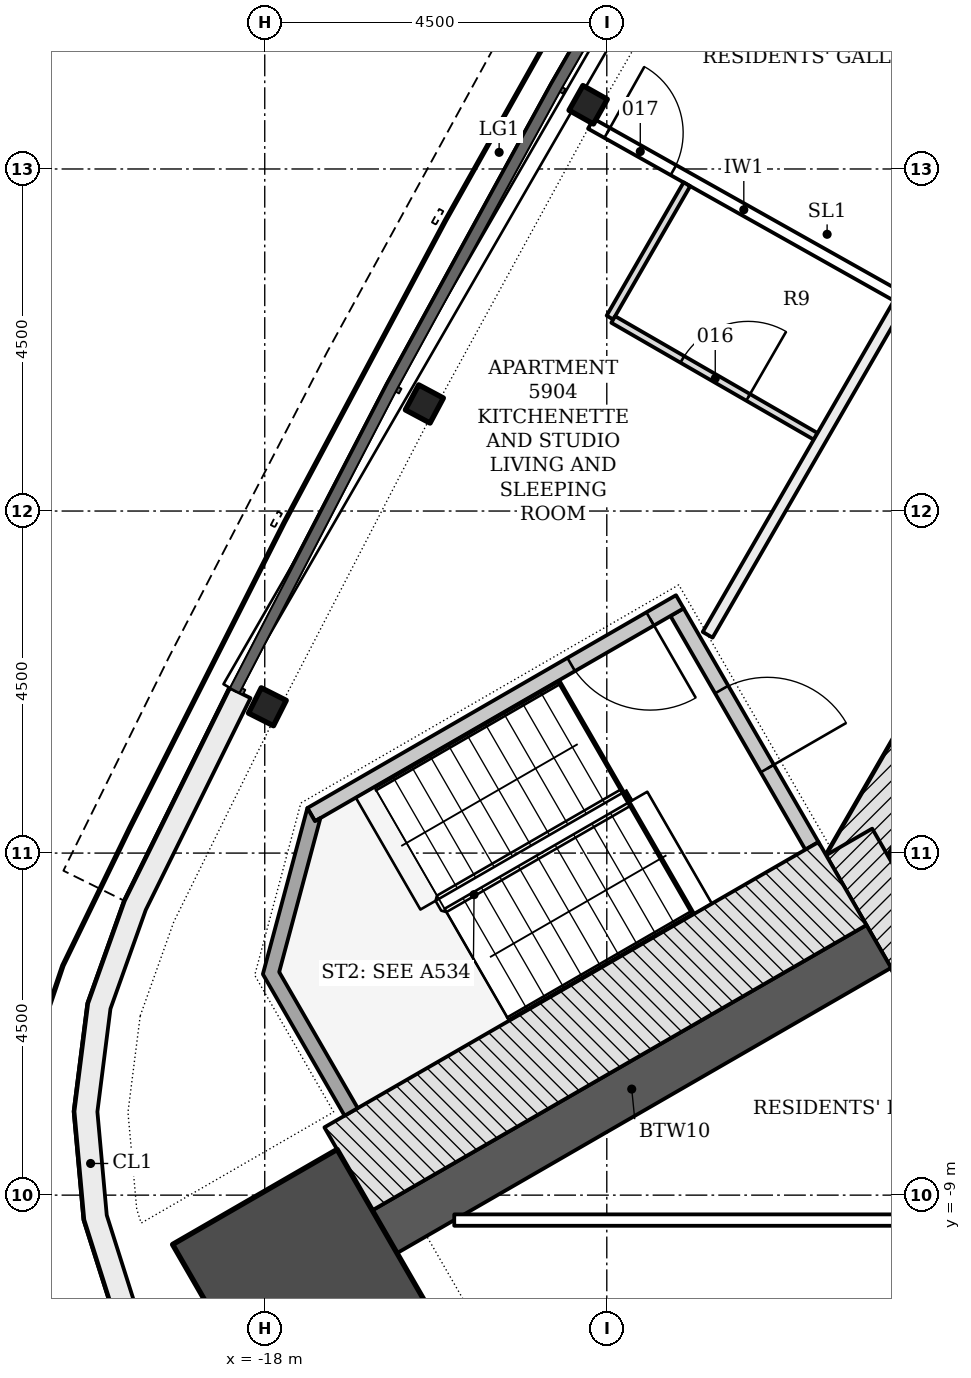
"""IFC4 building model, lengths in metres.
Left out: names, types, materials, properties, quantities, classifications, styles, units other than length and angle.
Written with IfcOpenShell. Run it as: python <this file> out.ifc"""

import sys

from ifc_helpers import new_model, si_unit, direction, frame, frame_2d, origin, origin_2d, place, context, subcontext, project, spatial, polyline, rectangle, i_section, outline, extrude, element, fill, save


model = new_model("IFC4")
c1 = context("Model", 3, precision=1e-05, world=origin(), true_north=direction((0.0, 1.0)))
c2 = subcontext(c1, "Body", "Model", "MODEL_VIEW")
j1 = project(units=[si_unit("LENGTHUNIT", "METRE"), si_unit("PLANEANGLEUNIT", "RADIAN")], contexts=[c1])
p1 = place(None, origin())
s1 = spatial("IfcSite", under=j1, at=p1, CompositionType="ELEMENT")
p2 = place(p1, origin())
s2 = spatial("IfcBuilding", under=s1, at=p2, CompositionType="ELEMENT")
p3 = place(p2, frame((0.0, 0.0, 229.2)))
s3 = spatial("IfcBuildingStorey", under=s2, at=p3, CompositionType="ELEMENT", Elevation=229.2)
p4 = place(p3, frame((-1.083, 11.281, -0.2), z_axis=(0.0, 0.0, 1.0), x_axis=(-0.500001446645, -0.866024568562, 0.0)))
e1 = element("IfcWall", 1, at=p4, inside=s3, PredefinedType="SHEAR", context=c2, shape_type="SweptSolid", body=[
    extrude(rectangle(XDim=18.458, YDim=0.7, at=frame_2d((9.229, 0.0))), origin(), (0.0, 0.0, 1.0), 3.6),
])
p5 = place(p4, frame((8.979, 0.0, 0.2)))
e2 = element("IfcOpeningElement", 2, at=p5, cuts=e1, PredefinedType="OPENING", context=c2, shape_type="SweptSolid", body=[
    extrude(rectangle(XDim=1.2, YDim=2.1, at=frame_2d((0.6, 1.05))), frame((0.0, 0.36, 0.0), z_axis=(0.0, -1.0, 0.0), x_axis=(1.0, 0.0, 0.0)), (0.0, 0.0, 1.0), 0.72),
])
p6 = place(p4, frame((11.029, 0.0, 0.2)))
e3 = element("IfcOpeningElement", 3, at=p6, cuts=e1, PredefinedType="OPENING", context=c2, shape_type="SweptSolid", body=[
    extrude(rectangle(XDim=1.2, YDim=2.1, at=frame_2d((0.6, 1.05))), frame((0.0, 0.36, 0.0), z_axis=(0.0, -1.0, 0.0), x_axis=(1.0, 0.0, 0.0)), (0.0, 0.0, 1.0), 0.72),
])
p7 = place(p3, frame((-10.311, -4.353, -0.2), z_axis=(0.0, 0.0, 1.0), x_axis=(0.500042739161, -0.866000726912, 0.0)))
e4 = element("IfcWall", 4, at=p7, inside=s3, PredefinedType="SHEAR", context=c2, shape_type="SweptSolid", body=[
    extrude(rectangle(XDim=2.771, YDim=0.7, at=frame_2d((1.386, 0.0))), origin(), (0.0, 0.0, 1.0), 3.6),
])
p8 = place(p3, frame((-9.922, -5.728, -0.2), z_axis=(0.0, 0.0, 1.0), x_axis=(-0.866026891245, -0.499997423634, 0.0)))
e5 = element("IfcWall", 5, at=p8, inside=s3, PredefinedType="SHEAR", context=c2, shape_type="SweptSolid", body=[
    extrude(rectangle(XDim=7.506, YDim=0.65, at=frame_2d((3.753, 0.0))), origin(), (0.0, 0.0, 1.0), 3.6),
])
p9 = place(p3, frame((-17.505, -10.106, -0.2), z_axis=(0.0, 0.0, 1.0), x_axis=(-0.866025403784, -0.5, 0.0)))
e6 = element("IfcColumn", 6, at=p9, inside=s3, PredefinedType="COLUMN", context=c2, shape_type="SweptSolid", body=[
    extrude(rectangle(XDim=2.5, YDim=2.5, at=origin_2d()), origin(), (0.0, 0.0, 1.0), 3.6),
])
for number, where, z_axis, x_axis in (
    (7, (-13.745, 5.345, -0.2), (0.0, 0.0, 1.0), (-0.49, -0.872, 0.0)),
    (8, (-15.9, 1.409, -0.2), (0.0, 0.0, 1.0), (-0.47, -0.883, 0.0)),
    (9, (-17.965, -2.575, -0.2), (0.0, 0.0, 1.0), (-0.45, -0.893, 0.0)),
):
    element("IfcColumn", number, at=place(p3, frame(where, z_axis=z_axis, x_axis=x_axis)), inside=s3, PredefinedType="COLUMN", context=c2, shape_type="SweptSolid", body=[
        extrude(i_section(OverallWidth=0.373, OverallDepth=0.368, WebThickness=0.015, FlangeThickness=0.024, FilletRadius=0.015, at=origin_2d()), origin(), (0.0, 0.0, 1.0), 3.6),
    ])
p10 = place(p3, origin())
e10 = element("IfcWall", 10, at=p10, inside=s3, PredefinedType="NOTDEFINED", context=c2, shape_type="SweptSolid", body=[
    extrude(outline(polyline([(-18.457, -2.328), (-19.842, -5.13), (-20.323, -6.478), (-20.504, -7.898), (-20.375, -9.323), (-19.942, -10.687), (-19.227, -11.927), (-18.261, -12.983), (-17.092, -13.808), (-15.772, -14.361), (-14.364, -14.619), (-11.244, -14.82), (-11.225, -14.521), (-14.327, -14.32), (-15.686, -14.072), (-16.945, -13.544), (-18.062, -12.757), (-18.983, -11.748), (-19.666, -10.566), (-20.079, -9.264), (-20.202, -7.903), (-20.03, -6.548), (-19.565, -5.248), (-18.188, -2.46), (-18.457, -2.328)])), origin(), (0.0, 0.0, 1.0), 3.3),
])
p11 = place(p3, frame((-12.576, -1.331, -0.2), z_axis=(0.0, 0.0, 1.0), x_axis=(0.499970499736, -0.8660424351, 0.0)))
e11 = element("IfcWall", 11, at=p11, inside=s3, PredefinedType="SHEAR", context=c2, shape_type="SweptSolid", body=[
    extrude(rectangle(XDim=3.55, YDim=0.2, at=frame_2d((1.775, 0.0))), origin(), (0.0, 0.0, 1.0), 3.6),
])
p12 = place(p11, frame((1.175, 0.0, 0.2)))
e12 = element("IfcOpeningElement", 12, at=p12, cuts=e11, PredefinedType="OPENING", context=c2, shape_type="SweptSolid", body=[
    extrude(rectangle(XDim=1.2, YDim=2.1, at=frame_2d((0.6, 1.05))), frame((0.0, 0.11, 0.0), z_axis=(0.0, -1.0, 0.0), x_axis=(1.0, 0.0, 0.0)), (0.0, 0.0, 1.0), 0.22),
])
p13 = place(p3, frame((-12.539, -1.194, -0.2), z_axis=(0.0, 0.0, 1.0), x_axis=(-0.866045472092, -0.499965239061, 0.0)))
e13 = element("IfcWall", 13, at=p13, inside=s3, PredefinedType="SHEAR", context=c2, shape_type="SweptSolid", body=[
    extrude(rectangle(XDim=5.6, YDim=0.2, at=frame_2d((2.8, 0.0))), origin(), (0.0, 0.0, 1.0), 3.6),
])
p14 = place(p13, frame((0.45, 0.0, 0.2)))
e14 = element("IfcOpeningElement", 14, at=p14, cuts=e13, PredefinedType="OPENING", context=c2, shape_type="SweptSolid", body=[
    extrude(rectangle(XDim=1.2, YDim=2.1, at=frame_2d((0.6, 1.05))), frame((0.0, 0.11, 0.0), z_axis=(0.0, -1.0, 0.0), x_axis=(1.0, 0.0, 0.0)), (0.0, 0.0, 1.0), 0.22),
])
p15 = place(p3, frame((-10.399, -4.901, -0.2), z_axis=(0.0, 0.0, 1.0), x_axis=(-0.866020939036, -0.500007733091, 0.0)))
e15 = element("IfcWall", 15, at=p15, inside=s3, PredefinedType="SHEAR", context=c2, shape_type="SweptSolid", body=[
    extrude(rectangle(XDim=7.507, YDim=1.261, at=frame_2d((3.753, 0.0))), origin(), (0.0, 0.0, 1.0), 3.6),
])
p16 = place(p3, frame((0.0, 0.0, -0.2)))
e16 = element("IfcWall", 16, at=p16, inside=s3, PredefinedType="SHEAR", context=c2, shape_type="SweptSolid", body=[
    extrude(outline(polyline([(-17.439, -3.907), (-18.025, -6.093), (-16.95, -7.955), (-16.777, -7.855), (-17.81, -6.065), (-17.267, -4.039), (-17.339, -4.081), (-17.339, -4.081), (-17.339, -4.081), (-17.339, -4.081), (-17.339, -4.081), (-17.339, -4.081), (-17.339, -4.081), (-17.339, -4.081), (-17.339, -4.081), (-17.339, -4.081), (-17.339, -4.081), (-17.339, -4.081), (-17.339, -4.081), (-17.339, -4.081), (-17.339, -4.081), (-17.339, -4.081), (-17.339, -4.081), (-17.439, -3.907)])), origin(), (0.0, 0.0, 1.0), 3.6),
])
p17 = place(p3, frame((-15.507, -9.328, 0.0), z_axis=(0.0, 0.0, 1.0), x_axis=(1.0, 0.0, 0.0)))
e17 = element("IfcWall", 17, at=p17, inside=s3, PredefinedType="PARTITIONING", context=c2, shape_type="SweptSolid", body=[
    extrude(rectangle(XDim=13.522, YDim=0.15, at=frame_2d((6.761, 0.0))), origin(), (0.0, 0.0, 1.0), 2.852),
])
p18 = place(p17, frame((6.236, 0.0, 0.0)))
e18 = element("IfcOpeningElement", 18, at=p18, cuts=e17, PredefinedType="OPENING", context=c2, shape_type="SweptSolid", body=[
    extrude(rectangle(XDim=1.0, YDim=2.1, at=frame_2d((0.5, 1.05))), frame((0.0, 0.085, 0.0), z_axis=(0.0, -1.0, 0.0), x_axis=(1.0, 0.0, 0.0)), (0.0, 0.0, 1.0), 0.17),
])
p19 = place(p3, frame((-9.619, 2.795, 0.0), z_axis=(0.0, 0.0, 1.0), x_axis=(-0.499963809755, -0.866046297224, 0.0)))
e19 = element("IfcWall", 19, at=p19, inside=s3, PredefinedType="PARTITIONING", context=c2, shape_type="SweptSolid", body=[
    extrude(rectangle(XDim=5.108, YDim=0.15, at=frame_2d((2.554, 0.0))), origin(), (0.0, 0.0, 1.0), 2.852),
])
p20 = place(p3, frame((-13.71, 5.096, 0.0), z_axis=(0.0, 0.0, 1.0), x_axis=(0.871644704197, -0.490138255644, 0.0)))
e20 = element("IfcWall", 20, at=p20, inside=s3, PredefinedType="PARTITIONING", context=c2, shape_type="SweptSolid", body=[
    extrude(rectangle(XDim=4.618, YDim=0.15, at=frame_2d((2.309, 0.0))), origin(), (0.0, 0.0, 1.0), 3.4),
])
p21 = place(p20, frame((0.247, 0.0, 0.0)))
e21 = element("IfcOpeningElement", 21, at=p21, cuts=e20, PredefinedType="OPENING", context=c2, shape_type="SweptSolid", body=[
    extrude(rectangle(XDim=1.0, YDim=2.1, at=frame_2d((0.5, 1.05))), frame((0.0, 0.085, 0.0), z_axis=(0.0, -1.0, 0.0), x_axis=(1.0, 0.0, 0.0)), (0.0, 0.0, 1.0), 0.17),
])
p22 = place(p3, frame((-12.446, 4.299, 0.0), z_axis=(0.0, 0.0, 1.0), x_axis=(-0.499938124251, -0.866061124818, 0.0)))
e22 = element("IfcWall", 22, at=p22, inside=s3, PredefinedType="PARTITIONING", context=c2, shape_type="SweptSolid", body=[
    extrude(rectangle(XDim=2.025, YDim=0.1, at=frame_2d((1.013, 0.0))), origin(), (0.0, 0.0, 1.0), 3.4),
])
p23 = place(p3, frame((-13.415, 2.52, 0.0), z_axis=(0.0, 0.0, 1.0), x_axis=(0.865996501658, -0.50005005661, 0.0)))
e23 = element("IfcWall", 23, at=p23, inside=s3, PredefinedType="PARTITIONING", context=c2, shape_type="SweptSolid", body=[
    extrude(rectangle(XDim=3.075, YDim=0.1, at=frame_2d((1.538, 0.0))), origin(), (0.0, 0.0, 1.0), 3.4),
])
p24 = place(p23, frame((1.05, 0.0, 0.0)))
e24 = element("IfcOpeningElement", 24, at=p24, cuts=e23, PredefinedType="OPENING", context=c2, shape_type="SweptSolid", body=[
    extrude(rectangle(XDim=1.0, YDim=2.1, at=frame_2d((0.5, 1.05))), frame((0.0, 0.06, 0.0), z_axis=(0.0, -1.0, 0.0), x_axis=(1.0, 0.0, 0.0)), (0.0, 0.0, 1.0), 0.12),
])
p25 = place(p12, origin())
e25 = element("IfcDoor", 25, at=p25, inside=s3, OperationType="SINGLE_SWING_RIGHT", PredefinedType="DOOR", context=c2, shape_type="SweptSolid", body=[
    extrude(rectangle(XDim=1.2, YDim=2.1, at=frame_2d((0.6, 1.05))), frame((0.0, 0.025, 0.0), z_axis=(0.0, -1.0, 0.0), x_axis=(1.0, 0.0, 0.0)), (0.0, 0.0, 1.0), 0.05),
])
fill(e12, e25)
p26 = place(p14, origin())
e26 = element("IfcDoor", 26, at=p26, inside=s3, OperationType="SINGLE_SWING_LEFT", PredefinedType="DOOR", context=c2, shape_type="SweptSolid", body=[
    extrude(rectangle(XDim=1.2, YDim=2.1, at=frame_2d((0.6, 1.05))), frame((0.0, 0.025, 0.0), z_axis=(0.0, -1.0, 0.0), x_axis=(1.0, 0.0, 0.0)), (0.0, 0.0, 1.0), 0.05),
])
fill(e14, e26)
p27 = place(p24, origin())
e27 = element("IfcDoor", 27, at=p27, inside=s3, OperationType="SINGLE_SWING_RIGHT", PredefinedType="DOOR", context=c2, shape_type="SweptSolid", body=[
    extrude(rectangle(XDim=1.0, YDim=2.1, at=frame_2d((0.5, 1.05))), frame((0.0, 0.025, 0.0), z_axis=(0.0, -1.0, 0.0), x_axis=(1.0, 0.0, 0.0)), (0.0, 0.0, 1.0), 0.05),
])
fill(e24, e27)
p28 = place(p21, origin())
e28 = element("IfcDoor", 28, at=p28, inside=s3, OperationType="SINGLE_SWING_LEFT", PredefinedType="DOOR", context=c2, shape_type="SweptSolid", body=[
    extrude(rectangle(XDim=1.0, YDim=2.1, at=frame_2d((0.5, 1.05))), frame((0.0, 0.025, 0.0), z_axis=(0.0, -1.0, 0.0), x_axis=(1.0, 0.0, 0.0)), (0.0, 0.0, 1.0), 0.05),
])
fill(e21, e28)
save(model, sys.argv[1])
